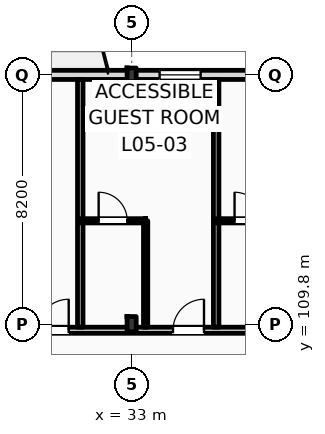
"""IFC4 building model, lengths in metres.
Left out: names, types, materials, properties, quantities, classifications, styles, units other than length and angle.
Written with IfcOpenShell. Run it as: python <this file> out.ifc"""

import sys

from ifc_helpers import new_model, si_unit, direction, frame, frame_2d, origin, origin_2d, place, context, subcontext, project, spatial, rectangle, i_section, extrude, element, fill, save


model = new_model("IFC4")
c1 = context("Model", 3, precision=1e-05, world=origin(), true_north=direction((0.0, 1.0)))
c2 = subcontext(c1, "Body", "Model", "MODEL_VIEW")
j1 = project(units=[si_unit("LENGTHUNIT", "METRE"), si_unit("PLANEANGLEUNIT", "RADIAN")], contexts=[c1])
p1 = place(None, origin())
s1 = spatial("IfcSite", under=j1, at=p1, CompositionType="ELEMENT")
p2 = place(p1, origin())
s2 = spatial("IfcBuilding", under=s1, at=p2, CompositionType="ELEMENT")
p3 = place(p2, frame((0.0, 0.0, 24.6)))
s3 = spatial("IfcBuildingStorey", under=s2, at=p3, CompositionType="ELEMENT", Elevation=24.6)
p4 = place(p3, frame((33.0, 109.8, 0.0), z_axis=(0.0, 0.0, 1.0), x_axis=(1.0, 0.0, 0.0)))
e1 = element("IfcColumn", 1, at=p4, inside=s3, PredefinedType="COLUMN", context=c2, shape_type="SweptSolid", body=[
    extrude(i_section(OverallWidth=0.3, OverallDepth=0.5, WebThickness=0.014, FlangeThickness=0.028, FilletRadius=0.027, at=origin_2d()), origin(), (0.0, 0.0, 1.0), 3.6),
])
p5 = place(p3, frame((33.0, 118.0, 0.0), z_axis=(0.0, 0.0, 1.0), x_axis=(1.0, 0.0, 0.0)))
e2 = element("IfcColumn", 2, at=p5, inside=s3, PredefinedType="COLUMN", context=c2, shape_type="SweptSolid", body=[
    extrude(i_section(OverallWidth=0.3, OverallDepth=0.45, WebThickness=0.014, FlangeThickness=0.026, FilletRadius=0.027, at=origin_2d()), origin(), (0.0, 0.0, 1.0), 3.6),
])
p6 = place(p3, frame((22.5, 118.0, 0.0), z_axis=(0.0, 0.0, 1.0), x_axis=(1.0, 0.0, 0.0)))
e3 = element("IfcWall", 3, at=p6, inside=s3, PredefinedType="STANDARD", context=c2, shape_type="SweptSolid", body=[
    extrude(rectangle(XDim=97.5, YDim=0.3, at=frame_2d((48.75, 0.0))), origin(), (0.0, 0.0, 1.0), 2.78),
])
p7 = place(p6, frame((0.91, 0.0, 0.9)))
e4 = element("IfcOpeningElement", 4, at=p7, cuts=e3, PredefinedType="OPENING", context=c2, shape_type="SweptSolid", body=[
    extrude(rectangle(XDim=0.9, YDim=1.7, at=frame_2d((0.45, 0.85))), frame((0.0, 0.16, 0.0), z_axis=(0.0, -1.0, 0.0), x_axis=(1.0, 0.0, 0.0)), (0.0, 0.0, 1.0), 0.32),
])
p8 = place(p6, frame((6.275, 0.0, 0.0)))
e5 = element("IfcOpeningElement", 5, at=p8, cuts=e3, PredefinedType="OPENING", context=c2, shape_type="SweptSolid", body=[
    extrude(rectangle(XDim=1.2, YDim=2.25, at=frame_2d((0.6, 1.125))), frame((0.0, 0.16, 0.0), z_axis=(0.0, -1.0, 0.0), x_axis=(1.0, 0.0, 0.0)), (0.0, 0.0, 1.0), 0.32),
])
p9 = place(p6, frame((11.42, 0.0, 0.9)))
e6 = element("IfcOpeningElement", 6, at=p9, cuts=e3, PredefinedType="OPENING", context=c2, shape_type="SweptSolid", body=[
    extrude(rectangle(XDim=1.35, YDim=1.7, at=frame_2d((0.675, 0.85))), frame((0.0, 0.16, 0.0), z_axis=(0.0, -1.0, 0.0), x_axis=(1.0, 0.0, 0.0)), (0.0, 0.0, 1.0), 0.32),
])
p10 = place(p6, frame((14.345, 0.0, 0.9)))
e7 = element("IfcOpeningElement", 7, at=p10, cuts=e3, PredefinedType="OPENING", context=c2, shape_type="SweptSolid", body=[
    extrude(rectangle(XDim=1.8, YDim=1.7, at=frame_2d((0.9, 0.85))), frame((0.0, 0.16, 0.0), z_axis=(0.0, -1.0, 0.0), x_axis=(1.0, 0.0, 0.0)), (0.0, 0.0, 1.0), 0.32),
])
p11 = place(p6, frame((19.27, 0.0, 0.9)))
e8 = element("IfcOpeningElement", 8, at=p11, cuts=e3, PredefinedType="OPENING", context=c2, shape_type="SweptSolid", body=[
    extrude(rectangle(XDim=1.95, YDim=1.7, at=frame_2d((0.975, 0.85))), frame((0.0, 0.16, 0.0), z_axis=(0.0, -1.0, 0.0), x_axis=(1.0, 0.0, 0.0)), (0.0, 0.0, 1.0), 0.32),
])
p12 = place(p6, frame((22.97, 0.0, 0.0)))
e9 = element("IfcOpeningElement", 9, at=p12, cuts=e3, PredefinedType="OPENING", context=c2, shape_type="SweptSolid", body=[
    extrude(rectangle(XDim=1.2, YDim=2.25, at=frame_2d((0.6, 1.125))), frame((0.0, 0.16, 0.0), z_axis=(0.0, -1.0, 0.0), x_axis=(1.0, 0.0, 0.0)), (0.0, 0.0, 1.0), 0.32),
])
p13 = place(p6, frame((26.92, 0.0, 0.9)))
e10 = element("IfcOpeningElement", 10, at=p13, cuts=e3, PredefinedType="OPENING", context=c2, shape_type="SweptSolid", body=[
    extrude(rectangle(XDim=2.25, YDim=1.7, at=frame_2d((1.125, 0.85))), frame((0.0, 0.16, 0.0), z_axis=(0.0, -1.0, 0.0), x_axis=(1.0, 0.0, 0.0)), (0.0, 0.0, 1.0), 0.32),
])
p14 = place(p6, frame((30.645, 0.0, 0.9)))
e11 = element("IfcOpeningElement", 11, at=p14, cuts=e3, PredefinedType="OPENING", context=c2, shape_type="SweptSolid", body=[
    extrude(rectangle(XDim=2.4, YDim=1.7, at=frame_2d((1.2, 0.85))), frame((0.0, 0.16, 0.0), z_axis=(0.0, -1.0, 0.0), x_axis=(1.0, 0.0, 0.0)), (0.0, 0.0, 1.0), 0.32),
])
p15 = place(p6, frame((36.71, 0.0, 0.0)))
e12 = element("IfcOpeningElement", 12, at=p15, cuts=e3, PredefinedType="OPENING", context=c2, shape_type="SweptSolid", body=[
    extrude(rectangle(XDim=1.2, YDim=2.25, at=frame_2d((0.6, 1.125))), frame((0.0, 0.16, 0.0), z_axis=(0.0, -1.0, 0.0), x_axis=(1.0, 0.0, 0.0)), (0.0, 0.0, 1.0), 0.32),
])
p16 = place(p6, frame((39.17, 0.0, 0.0)))
e13 = element("IfcOpeningElement", 13, at=p16, cuts=e3, PredefinedType="OPENING", context=c2, shape_type="SweptSolid", body=[
    extrude(rectangle(XDim=1.2, YDim=2.25, at=frame_2d((0.6, 1.125))), frame((0.0, 0.16, 0.0), z_axis=(0.0, -1.0, 0.0), x_axis=(1.0, 0.0, 0.0)), (0.0, 0.0, 1.0), 0.32),
])
p17 = place(p6, frame((43.22, 0.0, 0.9)))
e14 = element("IfcOpeningElement", 14, at=p17, cuts=e3, PredefinedType="OPENING", context=c2, shape_type="SweptSolid", body=[
    extrude(rectangle(XDim=2.85, YDim=1.7, at=frame_2d((1.425, 0.85))), frame((0.0, 0.16, 0.0), z_axis=(0.0, -1.0, 0.0), x_axis=(1.0, 0.0, 0.0)), (0.0, 0.0, 1.0), 0.32),
])
p18 = place(p6, frame((47.29, 0.0, 0.9)))
e15 = element("IfcOpeningElement", 15, at=p18, cuts=e3, PredefinedType="OPENING", context=c2, shape_type="SweptSolid", body=[
    extrude(rectangle(XDim=1.35, YDim=1.7, at=frame_2d((0.675, 0.85))), frame((0.0, 0.16, 0.0), z_axis=(0.0, -1.0, 0.0), x_axis=(1.0, 0.0, 0.0)), (0.0, 0.0, 1.0), 0.32),
])
p19 = place(p6, frame((52.91, 0.0, 0.0)))
e16 = element("IfcOpeningElement", 16, at=p19, cuts=e3, PredefinedType="OPENING", context=c2, shape_type="SweptSolid", body=[
    extrude(rectangle(XDim=1.2, YDim=2.25, at=frame_2d((0.6, 1.125))), frame((0.0, 0.16, 0.0), z_axis=(0.0, -1.0, 0.0), x_axis=(1.0, 0.0, 0.0)), (0.0, 0.0, 1.0), 0.32),
])
p20 = place(p6, frame((55.69, 0.0, 0.9)))
e17 = element("IfcOpeningElement", 17, at=p20, cuts=e3, PredefinedType="OPENING", context=c2, shape_type="SweptSolid", body=[
    extrude(rectangle(XDim=0.9, YDim=1.7, at=frame_2d((0.45, 0.85))), frame((0.0, 0.16, 0.0), z_axis=(0.0, -1.0, 0.0), x_axis=(1.0, 0.0, 0.0)), (0.0, 0.0, 1.0), 0.32),
])
p21 = place(p6, frame((59.82, 0.0, 0.9)))
e18 = element("IfcOpeningElement", 18, at=p21, cuts=e3, PredefinedType="OPENING", context=c2, shape_type="SweptSolid", body=[
    extrude(rectangle(XDim=3.25, YDim=1.7, at=frame_2d((1.625, 0.85))), frame((0.0, 0.16, 0.0), z_axis=(0.0, -1.0, 0.0), x_axis=(1.0, 0.0, 0.0)), (0.0, 0.0, 1.0), 0.32),
])
p22 = place(p6, frame((65.89, 0.0, 0.9)))
e19 = element("IfcOpeningElement", 19, at=p22, cuts=e3, PredefinedType="OPENING", context=c2, shape_type="SweptSolid", body=[
    extrude(rectangle(XDim=1.1, YDim=1.7, at=frame_2d((0.55, 0.85))), frame((0.0, 0.16, 0.0), z_axis=(0.0, -1.0, 0.0), x_axis=(1.0, 0.0, 0.0)), (0.0, 0.0, 1.0), 0.32),
])
p23 = place(p6, frame((69.245, 0.0, 0.0)))
e20 = element("IfcOpeningElement", 20, at=p23, cuts=e3, PredefinedType="OPENING", context=c2, shape_type="SweptSolid", body=[
    extrude(rectangle(XDim=1.2, YDim=2.25, at=frame_2d((0.6, 1.125))), frame((0.0, 0.16, 0.0), z_axis=(0.0, -1.0, 0.0), x_axis=(1.0, 0.0, 0.0)), (0.0, 0.0, 1.0), 0.32),
])
p24 = place(p6, frame((73.69, 0.0, 0.9)))
e21 = element("IfcOpeningElement", 21, at=p24, cuts=e3, PredefinedType="OPENING", context=c2, shape_type="SweptSolid", body=[
    extrude(rectangle(XDim=1.8, YDim=1.7, at=frame_2d((0.9, 0.85))), frame((0.0, 0.16, 0.0), z_axis=(0.0, -1.0, 0.0), x_axis=(1.0, 0.0, 0.0)), (0.0, 0.0, 1.0), 0.32),
])
p25 = place(p6, frame((76.62, 0.0, 0.9)))
e22 = element("IfcOpeningElement", 22, at=p25, cuts=e3, PredefinedType="OPENING", context=c2, shape_type="SweptSolid", body=[
    extrude(rectangle(XDim=3.25, YDim=1.7, at=frame_2d((1.625, 0.85))), frame((0.0, 0.16, 0.0), z_axis=(0.0, -1.0, 0.0), x_axis=(1.0, 0.0, 0.0)), (0.0, 0.0, 1.0), 0.32),
])
p26 = place(p6, frame((81.895, 0.0, 0.9)))
e23 = element("IfcOpeningElement", 23, at=p26, cuts=e3, PredefinedType="OPENING", context=c2, shape_type="SweptSolid", body=[
    extrude(rectangle(XDim=1.1, YDim=1.5, at=frame_2d((0.55, 0.75))), frame((0.0, 0.16, 0.0), z_axis=(0.0, -1.0, 0.0), x_axis=(1.0, 0.0, 0.0)), (0.0, 0.0, 1.0), 0.32),
])
p27 = place(p6, frame((86.02, 0.0, 0.9)))
e24 = element("IfcOpeningElement", 24, at=p27, cuts=e3, PredefinedType="OPENING", context=c2, shape_type="SweptSolid", body=[
    extrude(rectangle(XDim=1.25, YDim=1.6, at=frame_2d((0.625, 0.8))), frame((0.0, 0.16, 0.0), z_axis=(0.0, -1.0, 0.0), x_axis=(1.0, 0.0, 0.0)), (0.0, 0.0, 1.0), 0.32),
])
p28 = place(p6, frame((90.145, 0.0, 0.9)))
e25 = element("IfcOpeningElement", 25, at=p28, cuts=e3, PredefinedType="OPENING", context=c2, shape_type="SweptSolid", body=[
    extrude(rectangle(XDim=1.4, YDim=1.7, at=frame_2d((0.7, 0.85))), frame((0.0, 0.16, 0.0), z_axis=(0.0, -1.0, 0.0), x_axis=(1.0, 0.0, 0.0)), (0.0, 0.0, 1.0), 0.32),
])
p29 = place(p6, frame((94.155, 0.0, 0.9)))
e26 = element("IfcOpeningElement", 26, at=p29, cuts=e3, PredefinedType="OPENING", context=c2, shape_type="SweptSolid", body=[
    extrude(rectangle(XDim=1.6, YDim=1.7, at=frame_2d((0.8, 0.85))), frame((0.0, 0.16, 0.0), z_axis=(0.0, -1.0, 0.0), x_axis=(1.0, 0.0, 0.0)), (0.0, 0.0, 1.0), 0.32),
])
p30 = place(p3, frame((10.65, 109.6, 0.0), z_axis=(0.0, 0.0, 1.0), x_axis=(1.0, 0.0, 0.0)))
e27 = element("IfcWall", 27, at=p30, inside=s3, PredefinedType="PARTITIONING", context=c2, shape_type="SweptSolid", body=[
    extrude(rectangle(XDim=109.21, YDim=0.2, at=frame_2d((54.605, 0.0))), origin(), (0.0, 0.0, 1.0), 2.78),
])
p31 = place(p30, frame((12.705, 0.0, 0.0)))
e28 = element("IfcOpeningElement", 28, at=p31, cuts=e27, PredefinedType="OPENING", context=c2, shape_type="SweptSolid", body=[
    extrude(rectangle(XDim=1.02, YDim=2.2, at=frame_2d((0.51, 1.1))), frame((0.0, 0.11, 0.0), z_axis=(0.0, -1.0, 0.0), x_axis=(1.0, 0.0, 0.0)), (0.0, 0.0, 1.0), 0.22),
])
p32 = place(p30, frame((19.26, 0.0, 0.0)))
e29 = element("IfcOpeningElement", 29, at=p32, cuts=e27, PredefinedType="OPENING", context=c2, shape_type="SweptSolid", body=[
    extrude(rectangle(XDim=1.02, YDim=2.2, at=frame_2d((0.51, 1.1))), frame((0.0, 0.11, 0.0), z_axis=(0.0, -1.0, 0.0), x_axis=(1.0, 0.0, 0.0)), (0.0, 0.0, 1.0), 0.22),
])
p33 = place(p30, frame((23.71, 0.0, 0.0)))
e30 = element("IfcOpeningElement", 30, at=p33, cuts=e27, PredefinedType="OPENING", context=c2, shape_type="SweptSolid", body=[
    extrude(rectangle(XDim=1.02, YDim=2.2, at=frame_2d((0.51, 1.1))), frame((0.0, 0.11, 0.0), z_axis=(0.0, -1.0, 0.0), x_axis=(1.0, 0.0, 0.0)), (0.0, 0.0, 1.0), 0.22),
])
p34 = place(p30, frame((27.66, 0.0, 0.0)))
e31 = element("IfcOpeningElement", 31, at=p34, cuts=e27, PredefinedType="OPENING", context=c2, shape_type="SweptSolid", body=[
    extrude(rectangle(XDim=1.02, YDim=2.2, at=frame_2d((0.51, 1.1))), frame((0.0, 0.11, 0.0), z_axis=(0.0, -1.0, 0.0), x_axis=(1.0, 0.0, 0.0)), (0.0, 0.0, 1.0), 0.22),
])
p35 = place(p30, frame((31.89, 0.0, 0.0)))
e32 = element("IfcOpeningElement", 32, at=p35, cuts=e27, PredefinedType="OPENING", context=c2, shape_type="SweptSolid", body=[
    extrude(rectangle(XDim=0.96, YDim=2.2, at=frame_2d((0.48, 1.1))), frame((0.0, 0.11, 0.0), z_axis=(0.0, -1.0, 0.0), x_axis=(1.0, 0.0, 0.0)), (0.0, 0.0, 1.0), 0.22),
])
p36 = place(p30, frame((33.94, 0.0, 0.0)))
e33 = element("IfcOpeningElement", 33, at=p36, cuts=e27, PredefinedType="OPENING", context=c2, shape_type="SweptSolid", body=[
    extrude(rectangle(XDim=0.96, YDim=2.2, at=frame_2d((0.48, 1.1))), frame((0.0, 0.11, 0.0), z_axis=(0.0, -1.0, 0.0), x_axis=(1.0, 0.0, 0.0)), (0.0, 0.0, 1.0), 0.22),
])
p37 = place(p30, frame((40.29, 0.0, 0.0)))
e34 = element("IfcOpeningElement", 34, at=p37, cuts=e27, PredefinedType="OPENING", context=c2, shape_type="SweptSolid", body=[
    extrude(rectangle(XDim=0.96, YDim=2.2, at=frame_2d((0.48, 1.1))), frame((0.0, 0.11, 0.0), z_axis=(0.0, -1.0, 0.0), x_axis=(1.0, 0.0, 0.0)), (0.0, 0.0, 1.0), 0.22),
])
p38 = place(p30, frame((42.34, 0.0, 0.0)))
e35 = element("IfcOpeningElement", 35, at=p38, cuts=e27, PredefinedType="OPENING", context=c2, shape_type="SweptSolid", body=[
    extrude(rectangle(XDim=0.96, YDim=2.2, at=frame_2d((0.48, 1.1))), frame((0.0, 0.11, 0.0), z_axis=(0.0, -1.0, 0.0), x_axis=(1.0, 0.0, 0.0)), (0.0, 0.0, 1.0), 0.22),
])
p39 = place(p30, frame((48.69, 0.0, 0.0)))
e36 = element("IfcOpeningElement", 36, at=p39, cuts=e27, PredefinedType="OPENING", context=c2, shape_type="SweptSolid", body=[
    extrude(rectangle(XDim=0.96, YDim=2.2, at=frame_2d((0.48, 1.1))), frame((0.0, 0.11, 0.0), z_axis=(0.0, -1.0, 0.0), x_axis=(1.0, 0.0, 0.0)), (0.0, 0.0, 1.0), 0.22),
])
p40 = place(p30, frame((50.74, 0.0, 0.0)))
e37 = element("IfcOpeningElement", 37, at=p40, cuts=e27, PredefinedType="OPENING", context=c2, shape_type="SweptSolid", body=[
    extrude(rectangle(XDim=0.96, YDim=2.2, at=frame_2d((0.48, 1.1))), frame((0.0, 0.11, 0.0), z_axis=(0.0, -1.0, 0.0), x_axis=(1.0, 0.0, 0.0)), (0.0, 0.0, 1.0), 0.22),
])
p41 = place(p30, frame((57.09, 0.0, 0.0)))
e38 = element("IfcOpeningElement", 38, at=p41, cuts=e27, PredefinedType="OPENING", context=c2, shape_type="SweptSolid", body=[
    extrude(rectangle(XDim=0.96, YDim=2.2, at=frame_2d((0.48, 1.1))), frame((0.0, 0.11, 0.0), z_axis=(0.0, -1.0, 0.0), x_axis=(1.0, 0.0, 0.0)), (0.0, 0.0, 1.0), 0.22),
])
p42 = place(p30, frame((59.14, 0.0, 0.0)))
e39 = element("IfcOpeningElement", 39, at=p42, cuts=e27, PredefinedType="OPENING", context=c2, shape_type="SweptSolid", body=[
    extrude(rectangle(XDim=0.96, YDim=2.2, at=frame_2d((0.48, 1.1))), frame((0.0, 0.11, 0.0), z_axis=(0.0, -1.0, 0.0), x_axis=(1.0, 0.0, 0.0)), (0.0, 0.0, 1.0), 0.22),
])
p43 = place(p30, frame((65.49, 0.0, 0.0)))
e40 = element("IfcOpeningElement", 40, at=p43, cuts=e27, PredefinedType="OPENING", context=c2, shape_type="SweptSolid", body=[
    extrude(rectangle(XDim=0.96, YDim=2.2, at=frame_2d((0.48, 1.1))), frame((0.0, 0.11, 0.0), z_axis=(0.0, -1.0, 0.0), x_axis=(1.0, 0.0, 0.0)), (0.0, 0.0, 1.0), 0.22),
])
p44 = place(p30, frame((67.54, 0.0, 0.0)))
e41 = element("IfcOpeningElement", 41, at=p44, cuts=e27, PredefinedType="OPENING", context=c2, shape_type="SweptSolid", body=[
    extrude(rectangle(XDim=0.96, YDim=2.2, at=frame_2d((0.48, 1.1))), frame((0.0, 0.11, 0.0), z_axis=(0.0, -1.0, 0.0), x_axis=(1.0, 0.0, 0.0)), (0.0, 0.0, 1.0), 0.22),
])
p45 = place(p30, frame((73.89, 0.0, 0.0)))
e42 = element("IfcOpeningElement", 42, at=p45, cuts=e27, PredefinedType="OPENING", context=c2, shape_type="SweptSolid", body=[
    extrude(rectangle(XDim=0.96, YDim=2.2, at=frame_2d((0.48, 1.1))), frame((0.0, 0.11, 0.0), z_axis=(0.0, -1.0, 0.0), x_axis=(1.0, 0.0, 0.0)), (0.0, 0.0, 1.0), 0.22),
])
p46 = place(p30, frame((78.09, 0.0, 0.0)))
e43 = element("IfcOpeningElement", 43, at=p46, cuts=e27, PredefinedType="OPENING", context=c2, shape_type="SweptSolid", body=[
    extrude(rectangle(XDim=0.96, YDim=2.2, at=frame_2d((0.48, 1.1))), frame((0.0, 0.11, 0.0), z_axis=(0.0, -1.0, 0.0), x_axis=(1.0, 0.0, 0.0)), (0.0, 0.0, 1.0), 0.22),
])
p47 = place(p30, frame((82.29, 0.0, 0.0)))
e44 = element("IfcOpeningElement", 44, at=p47, cuts=e27, PredefinedType="OPENING", context=c2, shape_type="SweptSolid", body=[
    extrude(rectangle(XDim=0.96, YDim=2.2, at=frame_2d((0.48, 1.1))), frame((0.0, 0.11, 0.0), z_axis=(0.0, -1.0, 0.0), x_axis=(1.0, 0.0, 0.0)), (0.0, 0.0, 1.0), 0.22),
])
p48 = place(p30, frame((86.49, 0.0, 0.0)))
e45 = element("IfcOpeningElement", 45, at=p48, cuts=e27, PredefinedType="OPENING", context=c2, shape_type="SweptSolid", body=[
    extrude(rectangle(XDim=0.96, YDim=2.2, at=frame_2d((0.48, 1.1))), frame((0.0, 0.11, 0.0), z_axis=(0.0, -1.0, 0.0), x_axis=(1.0, 0.0, 0.0)), (0.0, 0.0, 1.0), 0.22),
])
p49 = place(p30, frame((88.54, 0.0, 0.0)))
e46 = element("IfcOpeningElement", 46, at=p49, cuts=e27, PredefinedType="OPENING", context=c2, shape_type="SweptSolid", body=[
    extrude(rectangle(XDim=0.96, YDim=2.2, at=frame_2d((0.48, 1.1))), frame((0.0, 0.11, 0.0), z_axis=(0.0, -1.0, 0.0), x_axis=(1.0, 0.0, 0.0)), (0.0, 0.0, 1.0), 0.22),
])
p50 = place(p30, frame((94.89, 0.0, 0.0)))
e47 = element("IfcOpeningElement", 47, at=p50, cuts=e27, PredefinedType="OPENING", context=c2, shape_type="SweptSolid", body=[
    extrude(rectangle(XDim=0.96, YDim=2.2, at=frame_2d((0.48, 1.1))), frame((0.0, 0.11, 0.0), z_axis=(0.0, -1.0, 0.0), x_axis=(1.0, 0.0, 0.0)), (0.0, 0.0, 1.0), 0.22),
])
p51 = place(p30, frame((96.94, 0.0, 0.0)))
e48 = element("IfcOpeningElement", 48, at=p51, cuts=e27, PredefinedType="OPENING", context=c2, shape_type="SweptSolid", body=[
    extrude(rectangle(XDim=0.96, YDim=2.2, at=frame_2d((0.48, 1.1))), frame((0.0, 0.11, 0.0), z_axis=(0.0, -1.0, 0.0), x_axis=(1.0, 0.0, 0.0)), (0.0, 0.0, 1.0), 0.22),
])
p52 = place(p30, frame((103.29, 0.0, 0.0)))
e49 = element("IfcOpeningElement", 49, at=p52, cuts=e27, PredefinedType="OPENING", context=c2, shape_type="SweptSolid", body=[
    extrude(rectangle(XDim=0.96, YDim=2.2, at=frame_2d((0.48, 1.1))), frame((0.0, 0.11, 0.0), z_axis=(0.0, -1.0, 0.0), x_axis=(1.0, 0.0, 0.0)), (0.0, 0.0, 1.0), 0.22),
])
p53 = place(p30, frame((105.25, 0.0, 0.0)))
e50 = element("IfcOpeningElement", 50, at=p53, cuts=e27, PredefinedType="OPENING", context=c2, shape_type="SweptSolid", body=[
    extrude(rectangle(XDim=0.96, YDim=2.2, at=frame_2d((0.48, 1.1))), frame((0.0, 0.11, 0.0), z_axis=(0.0, -1.0, 0.0), x_axis=(1.0, 0.0, 0.0)), (0.0, 0.0, 1.0), 0.22),
])
p54 = place(p30, frame((2.716, 0.0, 0.0)))
e51 = element("IfcOpeningElement", 51, at=p54, cuts=e27, PredefinedType="OPENING", context=c2, shape_type="SweptSolid", body=[
    extrude(rectangle(XDim=1.35, YDim=2.25, at=frame_2d((0.675, 1.125))), frame((0.0, 0.11, 0.0), z_axis=(0.0, -1.0, 0.0), x_axis=(1.0, 0.0, 0.0)), (0.0, 0.0, 1.0), 0.22),
])
p55 = place(p30, frame((6.65, 0.0, 0.0)))
e52 = element("IfcOpeningElement", 52, at=p55, cuts=e27, PredefinedType="OPENING", context=c2, shape_type="SweptSolid", body=[
    extrude(rectangle(XDim=1.35, YDim=2.25, at=frame_2d((0.675, 1.125))), frame((0.0, 0.11, 0.0), z_axis=(0.0, -1.0, 0.0), x_axis=(1.0, 0.0, 0.0)), (0.0, 0.0, 1.0), 0.22),
])
p56 = place(p30, frame((10.583, 0.0, 0.0)))
e53 = element("IfcOpeningElement", 53, at=p56, cuts=e27, PredefinedType="OPENING", context=c2, shape_type="SweptSolid", body=[
    extrude(rectangle(XDim=1.35, YDim=2.25, at=frame_2d((0.675, 1.125))), frame((0.0, 0.11, 0.0), z_axis=(0.0, -1.0, 0.0), x_axis=(1.0, 0.0, 0.0)), (0.0, 0.0, 1.0), 0.22),
])
p57 = place(p3, frame((31.31, 109.7, 0.0), z_axis=(0.0, 0.0, 1.0), x_axis=(0.0, 1.0, 0.0)))
e54 = element("IfcWall", 54, at=p57, inside=s3, PredefinedType="PARTITIONING", context=c2, shape_type="SweptSolid", body=[
    extrude(rectangle(XDim=8.15, YDim=0.18, at=frame_2d((4.075, 0.0))), origin(), (0.0, 0.0, 1.0), 3.34),
])
p58 = place(p3, frame((35.78, 109.7, 0.0), z_axis=(0.0, 0.0, 1.0), x_axis=(0.0, 1.0, 0.0)))
e55 = element("IfcWall", 55, at=p58, inside=s3, PredefinedType="PARTITIONING", context=c2, shape_type="SweptSolid", body=[
    extrude(rectangle(XDim=8.15, YDim=0.18, at=frame_2d((4.075, 0.0))), origin(), (0.0, 0.0, 1.0), 3.03),
])
p59 = place(p3, frame((33.46, 109.7, 0.0), z_axis=(0.0, 0.0, 1.0), x_axis=(0.0, 1.0, 0.0)))
e56 = element("IfcWall", 56, at=p59, inside=s3, PredefinedType="PARTITIONING", context=c2, shape_type="SweptSolid", body=[
    extrude(rectangle(XDim=3.5, YDim=0.14, at=frame_2d((1.75, 0.0))), origin(), (0.0, 0.0, 1.0), 3.34),
])
p60 = place(p3, frame((31.31, 113.2, 0.0), z_axis=(0.0, 0.0, 1.0), x_axis=(1.0, 0.0, 0.0)))
e57 = element("IfcWall", 57, at=p60, inside=s3, PredefinedType="PARTITIONING", context=c2, shape_type="SweptSolid", body=[
    extrude(rectangle(XDim=2.15, YDim=0.14, at=frame_2d((1.075, 0.0))), origin(), (0.0, 0.0, 1.0), 3.34),
])
p61 = place(p60, frame((0.605, 0.0, 0.0)))
e58 = element("IfcOpeningElement", 58, at=p61, cuts=e57, PredefinedType="OPENING", context=c2, shape_type="SweptSolid", body=[
    extrude(rectangle(XDim=0.94, YDim=2.15, at=frame_2d((0.47, 1.075))), frame((0.0, 0.08, 0.0), z_axis=(0.0, -1.0, 0.0), x_axis=(1.0, 0.0, 0.0)), (0.0, 0.0, 1.0), 0.16),
])
p62 = place(p3, frame((35.78, 113.2, 0.0), z_axis=(0.0, 0.0, 1.0), x_axis=(1.0, 0.0, 0.0)))
e59 = element("IfcWall", 59, at=p62, inside=s3, PredefinedType="PARTITIONING", context=c2, shape_type="SweptSolid", body=[
    extrude(rectangle(XDim=2.15, YDim=0.14, at=frame_2d((1.075, 0.0))), origin(), (0.0, 0.0, 1.0), 3.34),
])
p63 = place(p62, frame((0.605, 0.0, 0.0)))
e60 = element("IfcOpeningElement", 60, at=p63, cuts=e59, PredefinedType="OPENING", context=c2, shape_type="SweptSolid", body=[
    extrude(rectangle(XDim=0.94, YDim=2.15, at=frame_2d((0.47, 1.075))), frame((0.0, 0.08, 0.0), z_axis=(0.0, -1.0, 0.0), x_axis=(1.0, 0.0, 0.0)), (0.0, 0.0, 1.0), 0.16),
])
p64 = place(p9, origin())
e61 = element("IfcWindow", 61, at=p64, inside=s3, PartitioningType="DOUBLE_PANEL_VERTICAL", PredefinedType="WINDOW", context=c2, shape_type="SweptSolid", body=[
    extrude(rectangle(XDim=1.35, YDim=1.7, at=frame_2d((0.675, 0.85))), frame((0.0, 0.03, 0.0), z_axis=(0.0, -1.0, 0.0), x_axis=(1.0, 0.0, 0.0)), (0.0, 0.0, 1.0), 0.06),
])
fill(e6, e61)
p65 = place(p32, origin())
e62 = element("IfcDoor", 62, at=p65, inside=s3, OperationType="SINGLE_SWING_RIGHT", PredefinedType="DOOR", context=c2, shape_type="SweptSolid", body=[
    extrude(rectangle(XDim=1.02, YDim=2.2, at=frame_2d((0.51, 1.1))), frame((0.0, 0.025, 0.0), z_axis=(0.0, -1.0, 0.0), x_axis=(1.0, 0.0, 0.0)), (0.0, 0.0, 1.0), 0.05),
])
fill(e29, e62)
p66 = place(p33, origin())
e63 = element("IfcDoor", 63, at=p66, inside=s3, OperationType="SINGLE_SWING_RIGHT", PredefinedType="DOOR", context=c2, shape_type="SweptSolid", body=[
    extrude(rectangle(XDim=1.02, YDim=2.2, at=frame_2d((0.51, 1.1))), frame((0.0, 0.025, 0.0), z_axis=(0.0, -1.0, 0.0), x_axis=(1.0, 0.0, 0.0)), (0.0, 0.0, 1.0), 0.05),
])
fill(e30, e63)
p67 = place(p61, origin())
e64 = element("IfcDoor", 64, at=p67, inside=s3, OperationType="SINGLE_SWING_LEFT", PredefinedType="DOOR", context=c2, shape_type="SweptSolid", body=[
    extrude(rectangle(XDim=0.94, YDim=2.15, at=frame_2d((0.47, 1.075))), frame((0.0, 0.025, 0.0), z_axis=(0.0, -1.0, 0.0), x_axis=(1.0, 0.0, 0.0)), (0.0, 0.0, 1.0), 0.05),
])
fill(e58, e64)
p68 = place(p63, origin())
e65 = element("IfcDoor", 65, at=p68, inside=s3, OperationType="SINGLE_SWING_LEFT", PredefinedType="DOOR", context=c2, shape_type="SweptSolid", body=[
    extrude(rectangle(XDim=0.94, YDim=2.15, at=frame_2d((0.47, 1.075))), frame((0.0, 0.025, 0.0), z_axis=(0.0, -1.0, 0.0), x_axis=(1.0, 0.0, 0.0)), (0.0, 0.0, 1.0), 0.05),
])
fill(e60, e65)
save(model, sys.argv[1])
